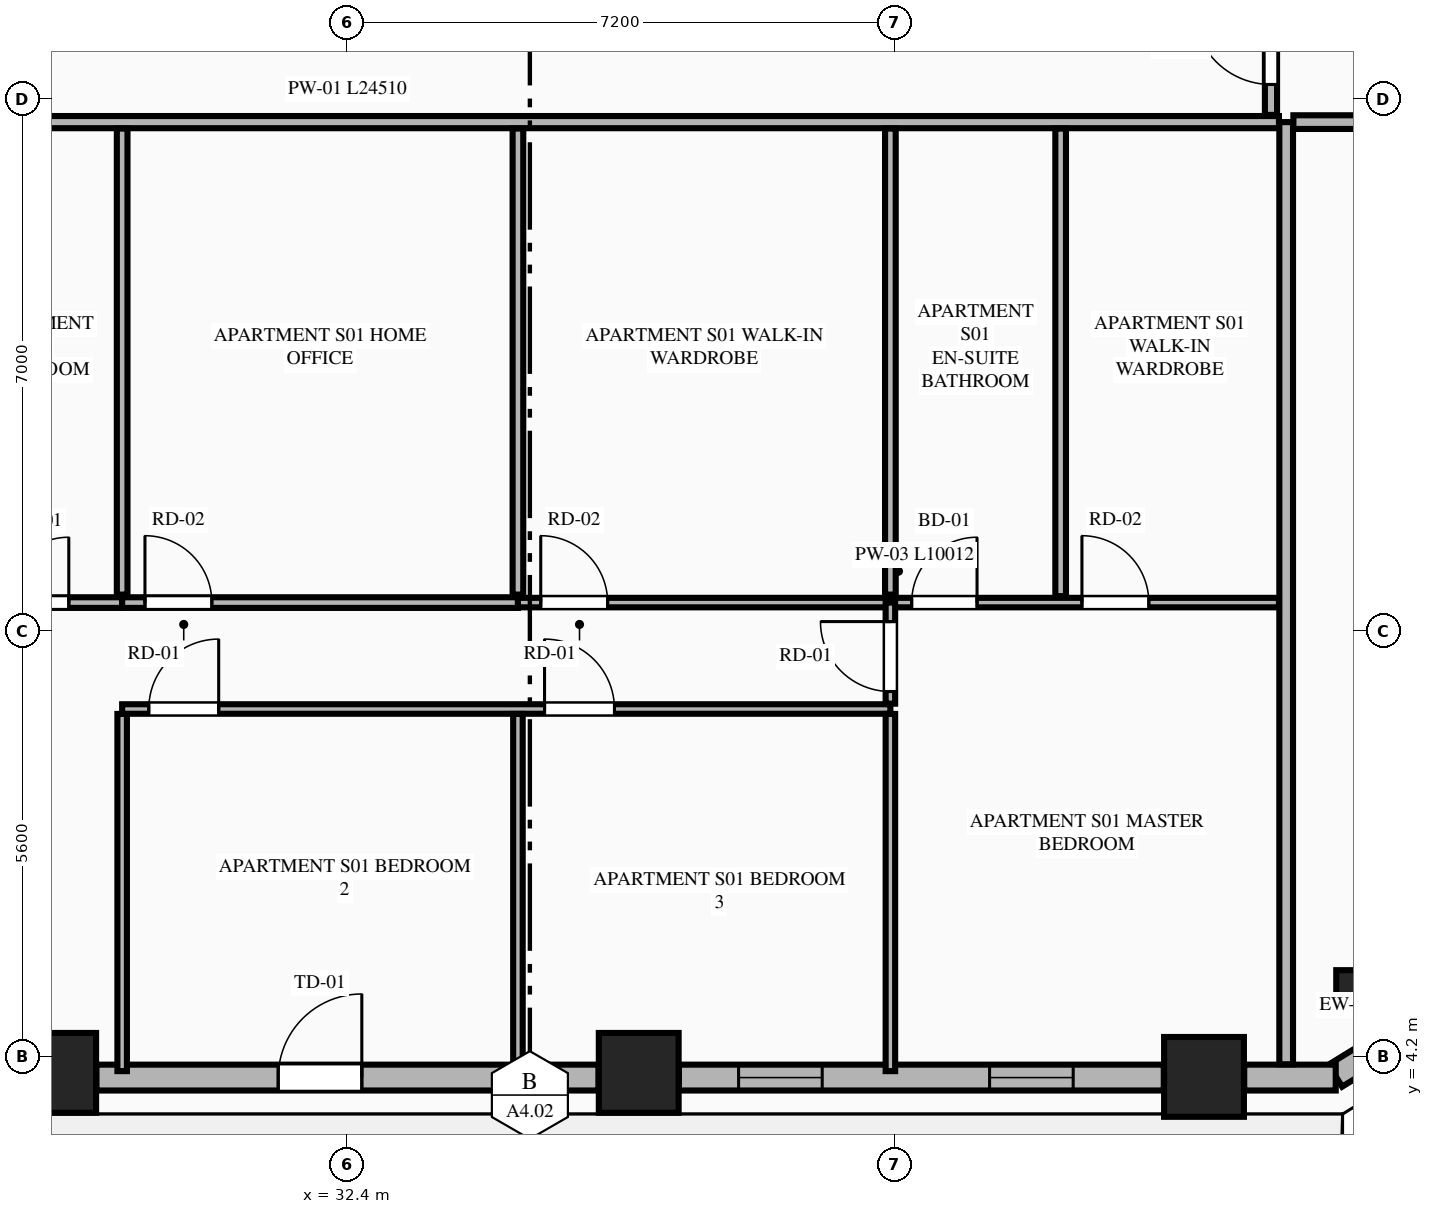
"""IFC4 building model, lengths in metres.
Left out: names, types, materials, properties, quantities, classifications, styles, units other than length and angle.
Written with IfcOpenShell. Run it as: python <this file> out.ifc"""

import sys

from ifc_helpers import new_model, si_unit, direction, frame, frame_2d, origin, origin_2d, place, context, subcontext, project, spatial, rectangle, extrude, element, fill, save


model = new_model("IFC4")
c1 = context("Model", 3, precision=1e-05, world=origin(), true_north=direction((0.0, 1.0)))
c2 = subcontext(c1, "Body", "Model", "MODEL_VIEW")
j1 = project(units=[si_unit("LENGTHUNIT", "METRE"), si_unit("PLANEANGLEUNIT", "RADIAN")], contexts=[c1])
p1 = place(None, origin())
s1 = spatial("IfcSite", under=j1, at=p1, CompositionType="ELEMENT")
p2 = place(p1, origin())
s2 = spatial("IfcBuilding", under=s1, at=p2, CompositionType="ELEMENT")
p3 = place(p2, frame((0.0, 0.0, 119.7)))
s3 = spatial("IfcBuildingStorey", under=s2, at=p3, CompositionType="ELEMENT", Elevation=119.7)
for number, where, z_axis, x_axis in (
    (1, (28.568, 3.992, 0.0), (0.0, 0.0, 1.0), (1.0, 0.0, 0.0)),
    (2, (36.232, 3.992, 0.0), (0.0, 0.0, 1.0), (1.0, 0.0, 0.0)),
    (3, (43.669, 3.939, 0.0), (0.0, 0.0, 1.0), (1.0, 0.0, 0.0)),
):
    element("IfcColumn", number, at=place(p3, frame(where, z_axis=z_axis, x_axis=x_axis)), inside=s3, PredefinedType="COLUMN", context=c2, shape_type="SweptSolid", body=[
        extrude(rectangle(XDim=1.05, YDim=1.05, at=origin_2d()), origin(), (0.0, 0.0, 1.0), 3.55),
    ])
p4 = place(p3, frame((45.659, 5.093, 0.0), z_axis=(0.0, 0.0, 1.0), x_axis=(0.865160173452, 0.501495637342, 0.0)))
e4 = element("IfcColumn", 4, at=p4, inside=s3, PredefinedType="PILASTER", context=c2, shape_type="SweptSolid", body=[
    extrude(rectangle(XDim=0.5, YDim=0.35, at=origin_2d()), origin(), (0.0, 0.0, 1.0), 3.55),
])
p5 = place(p3, frame((45.397, 3.955, 0.0), z_axis=(0.0, 0.0, 1.0), x_axis=(0.851798915137, 0.523868884523, 0.0)))
e5 = element("IfcWall", 5, at=p5, inside=s3, PredefinedType="STANDARD", context=c2, shape_type="SweptSolid", body=[
    extrude(rectangle(XDim=1.848, YDim=0.34, at=frame_2d((0.924, 0.0))), origin(), (0.0, 0.0, 1.0), 3.34),
])
p6 = place(p3, frame((29.097, 3.93, 0.0), z_axis=(0.0, 0.0, 1.0), x_axis=(1.0, 0.0, 0.0)))
e6 = element("IfcWall", 6, at=p6, inside=s3, PredefinedType="STANDARD", context=c2, shape_type="SweptSolid", body=[
    extrude(rectangle(XDim=6.606, YDim=0.34, at=frame_2d((3.303, 0.0))), origin(), (0.0, 0.0, 1.0), 2.797),
])
p7 = place(p6, frame((2.392, 0.0, 0.0)))
e7 = element("IfcOpeningElement", 7, at=p7, cuts=e6, PredefinedType="OPENING", context=c2, shape_type="SweptSolid", body=[
    extrude(rectangle(XDim=1.1, YDim=2.25, at=frame_2d((0.55, 1.125))), frame((0.0, 0.18, 0.0), z_axis=(0.0, -1.0, 0.0), x_axis=(1.0, 0.0, 0.0)), (0.0, 0.0, 1.0), 0.36),
])
p8 = place(p3, frame((36.761, 3.93, 0.0), z_axis=(0.0, 0.0, 1.0), x_axis=(1.0, 0.0, 0.0)))
e8 = element("IfcWall", 8, at=p8, inside=s3, PredefinedType="STANDARD", context=c2, shape_type="SweptSolid", body=[
    extrude(rectangle(XDim=6.379, YDim=0.34, at=frame_2d((3.189, 0.0))), origin(), (0.0, 0.0, 1.0), 2.797),
])
p9 = place(p8, frame((0.785, 0.0, 0.75)))
e9 = element("IfcOpeningElement", 9, at=p9, cuts=e8, PredefinedType="OPENING", context=c2, shape_type="SweptSolid", body=[
    extrude(rectangle(XDim=1.1, YDim=1.897, at=frame_2d((0.55, 0.948))), frame((0.0, 0.18, 0.0), z_axis=(0.0, -1.0, 0.0), x_axis=(1.0, 0.0, 0.0)), (0.0, 0.0, 1.0), 0.36),
])
p10 = place(p8, frame((4.087, 0.0, 0.75)))
e10 = element("IfcOpeningElement", 10, at=p10, cuts=e8, PredefinedType="OPENING", context=c2, shape_type="SweptSolid", body=[
    extrude(rectangle(XDim=1.1, YDim=1.897, at=frame_2d((0.55, 0.948))), frame((0.0, 0.18, 0.0), z_axis=(0.0, -1.0, 0.0), x_axis=(1.0, 0.0, 0.0)), (0.0, 0.0, 1.0), 0.36),
])
p11 = place(p3, frame((44.198, 3.93, 0.0), z_axis=(0.0, 0.0, 1.0), x_axis=(1.0, 0.0, 0.0)))
e11 = element("IfcWall", 11, at=p11, inside=s3, PredefinedType="STANDARD", context=c2, shape_type="SweptSolid", body=[
    extrude(rectangle(XDim=1.204, YDim=0.34, at=frame_2d((0.602, 0.0))), origin(), (0.0, 0.0, 1.0), 3.34),
])
p12 = place(p3, frame((44.75, 4.105, 0.0), z_axis=(0.0, 0.0, 1.0), x_axis=(0.0, 1.0, 0.0)))
e12 = element("IfcWall", 12, at=p12, inside=s3, PredefinedType="PARTITIONING", context=c2, shape_type="SweptSolid", body=[
    extrude(rectangle(XDim=12.395, YDim=0.18, at=frame_2d((6.198, 0.0))), origin(), (0.0, 0.0, 1.0), 3.34),
])
p13 = place(p3, frame((20.145, 16.5, 0.0), z_axis=(0.0, 0.0, 1.0), x_axis=(1.0, 0.0, 0.0)))
e13 = element("IfcWall", 13, at=p13, inside=s3, PredefinedType="PARTITIONING", context=c2, shape_type="SweptSolid", body=[
    extrude(rectangle(XDim=24.51, YDim=0.16, at=frame_2d((12.255, 0.0))), origin(), (0.0, 0.0, 1.0), 3.34),
])
p14 = place(p13, frame((0.405, 0.0, 0.0)))
e14 = element("IfcOpeningElement", 14, at=p14, cuts=e13, PredefinedType="OPENING", context=c2, shape_type="SweptSolid", body=[
    extrude(rectangle(XDim=1.35, YDim=2.35, at=frame_2d((0.675, 1.175))), frame((0.0, 0.09, 0.0), z_axis=(0.0, -1.0, 0.0), x_axis=(1.0, 0.0, 0.0)), (0.0, 0.0, 1.0), 0.18),
])
p15 = place(p3, frame((22.1, 10.179, 0.0), z_axis=(0.0, 0.0, 1.0), x_axis=(1.0, 0.0, 0.0)))
e15 = element("IfcWall", 15, at=p15, inside=s3, PredefinedType="PLUMBINGWALL", context=c2, shape_type="SweptSolid", body=[
    extrude(rectangle(XDim=7.336, YDim=0.14, at=frame_2d((3.668, 0.0))), origin(), (0.0, 0.0, 1.0), 3.34),
])
p16 = place(p15, frame((5.774, 0.0, 0.0)))
e16 = element("IfcOpeningElement", 16, at=p16, cuts=e15, PredefinedType="OPENING", context=c2, shape_type="SweptSolid", body=[
    extrude(rectangle(XDim=0.86, YDim=2.1, at=frame_2d((0.43, 1.05))), frame((0.0, 0.08, 0.0), z_axis=(0.0, -1.0, 0.0), x_axis=(1.0, 0.0, 0.0)), (0.0, 0.0, 1.0), 0.16),
])
p17 = place(p15, frame((0.26, 0.0, 0.0)))
e17 = element("IfcOpeningElement", 17, at=p17, cuts=e15, PredefinedType="OPENING", context=c2, shape_type="SweptSolid", body=[
    extrude(rectangle(XDim=0.88, YDim=2.15, at=frame_2d((0.44, 1.075))), frame((0.0, 0.08, 0.0), z_axis=(0.0, -1.0, 0.0), x_axis=(1.0, 0.0, 0.0)), (0.0, 0.0, 1.0), 0.16),
])
p18 = place(p15, frame((3.485, 0.0, 0.0)))
e18 = element("IfcOpeningElement", 18, at=p18, cuts=e15, PredefinedType="OPENING", context=c2, shape_type="SweptSolid", body=[
    extrude(rectangle(XDim=0.88, YDim=2.15, at=frame_2d((0.44, 1.075))), frame((0.0, 0.08, 0.0), z_axis=(0.0, -1.0, 0.0), x_axis=(1.0, 0.0, 0.0)), (0.0, 0.0, 1.0), 0.16),
])
p19 = place(p3, frame((29.436, 10.179, 0.0), z_axis=(0.0, 0.0, 1.0), x_axis=(1.0, 0.0, 0.0)))
e19 = element("IfcWall", 19, at=p19, inside=s3, PredefinedType="PLUMBINGWALL", context=c2, shape_type="SweptSolid", body=[
    extrude(rectangle(XDim=5.207, YDim=0.14, at=frame_2d((2.604, 0.0))), origin(), (0.0, 0.0, 1.0), 3.34),
])
p20 = place(p19, frame((0.3, 0.0, 0.0)))
e20 = element("IfcOpeningElement", 20, at=p20, cuts=e19, PredefinedType="OPENING", context=c2, shape_type="SweptSolid", body=[
    extrude(rectangle(XDim=0.88, YDim=2.15, at=frame_2d((0.44, 1.075))), frame((0.0, 0.08, 0.0), z_axis=(0.0, -1.0, 0.0), x_axis=(1.0, 0.0, 0.0)), (0.0, 0.0, 1.0), 0.16),
])
p21 = place(p3, frame((34.643, 10.179, 0.0), z_axis=(0.0, 0.0, 1.0), x_axis=(1.0, 0.0, 0.0)))
e21 = element("IfcWall", 21, at=p21, inside=s3, PredefinedType="PARTITIONING", context=c2, shape_type="SweptSolid", body=[
    extrude(rectangle(XDim=10.012, YDim=0.125, at=frame_2d((5.006, 0.0))), origin(), (0.0, 0.0, 1.0), 3.34),
])
p22 = place(p21, frame((5.18, 0.0, 0.0)))
e22 = element("IfcOpeningElement", 22, at=p22, cuts=e21, PredefinedType="OPENING", context=c2, shape_type="SweptSolid", body=[
    extrude(rectangle(XDim=0.86, YDim=2.1, at=frame_2d((0.43, 1.05))), frame((0.0, 0.073, 0.0), z_axis=(0.0, -1.0, 0.0), x_axis=(1.0, 0.0, 0.0)), (0.0, 0.0, 1.0), 0.145),
])
p23 = place(p21, frame((7.42, 0.0, 0.0)))
e23 = element("IfcOpeningElement", 23, at=p23, cuts=e21, PredefinedType="OPENING", context=c2, shape_type="SweptSolid", body=[
    extrude(rectangle(XDim=0.88, YDim=2.15, at=frame_2d((0.44, 1.075))), frame((0.0, 0.073, 0.0), z_axis=(0.0, -1.0, 0.0), x_axis=(1.0, 0.0, 0.0)), (0.0, 0.0, 1.0), 0.145),
])
p24 = place(p21, frame((0.3, 0.0, 0.0)))
e24 = element("IfcOpeningElement", 24, at=p24, cuts=e21, PredefinedType="OPENING", context=c2, shape_type="SweptSolid", body=[
    extrude(rectangle(XDim=0.88, YDim=2.15, at=frame_2d((0.44, 1.075))), frame((0.0, 0.073, 0.0), z_axis=(0.0, -1.0, 0.0), x_axis=(1.0, 0.0, 0.0)), (0.0, 0.0, 1.0), 0.145),
])
p25 = place(p3, frame((29.436, 4.015, 0.0), z_axis=(0.0, 0.0, 1.0), x_axis=(0.0, 1.0, 0.0)))
e25 = element("IfcWall", 25, at=p25, inside=s3, PredefinedType="PARTITIONING", context=c2, shape_type="SweptSolid", body=[
    extrude(rectangle(XDim=4.699, YDim=0.125, at=frame_2d((2.35, 0.0))), origin(), (0.0, 0.0, 1.0), 3.34),
])
p26 = place(p3, frame((29.436, 8.779, 0.0), z_axis=(0.0, 0.0, 1.0), x_axis=(1.0, 0.0, 0.0)))
e26 = element("IfcWall", 26, at=p26, inside=s3, PredefinedType="PARTITIONING", context=c2, shape_type="SweptSolid", body=[
    extrude(rectangle(XDim=10.107, YDim=0.125, at=frame_2d((5.053, 0.0))), origin(), (0.0, 0.0, 1.0), 3.34),
])
p27 = place(p26, frame((0.35, 0.0, 0.0)))
e27 = element("IfcOpeningElement", 27, at=p27, cuts=e26, PredefinedType="OPENING", context=c2, shape_type="SweptSolid", body=[
    extrude(rectangle(XDim=0.92, YDim=2.15, at=frame_2d((0.46, 1.075))), frame((0.0, 0.073, 0.0), z_axis=(0.0, -1.0, 0.0), x_axis=(1.0, 0.0, 0.0)), (0.0, 0.0, 1.0), 0.145),
])
p28 = place(p26, frame((5.557, 0.0, 0.0)))
e28 = element("IfcOpeningElement", 28, at=p28, cuts=e26, PredefinedType="OPENING", context=c2, shape_type="SweptSolid", body=[
    extrude(rectangle(XDim=0.92, YDim=2.15, at=frame_2d((0.46, 1.075))), frame((0.0, 0.073, 0.0), z_axis=(0.0, -1.0, 0.0), x_axis=(1.0, 0.0, 0.0)), (0.0, 0.0, 1.0), 0.145),
])
p29 = place(p3, frame((39.543, 8.849, 0.0), z_axis=(0.0, 0.0, 1.0), x_axis=(0.0, 1.0, 0.0)))
e29 = element("IfcWall", 29, at=p29, inside=s3, PredefinedType="PARTITIONING", context=c2, shape_type="SweptSolid", body=[
    extrude(rectangle(XDim=1.33, YDim=0.125, at=frame_2d((0.665, 0.0))), origin(), (0.0, 0.0, 1.0), 3.34),
])
p30 = place(p29, frame((0.16, 0.0, 0.0)))
e30 = element("IfcOpeningElement", 30, at=p30, cuts=e29, PredefinedType="OPENING", context=c2, shape_type="SweptSolid", body=[
    extrude(rectangle(XDim=0.92, YDim=2.15, at=frame_2d((0.46, 1.075))), frame((0.0, 0.073, 0.0), z_axis=(0.0, -1.0, 0.0), x_axis=(1.0, 0.0, 0.0)), (0.0, 0.0, 1.0), 0.145),
])
for number, where, z_axis, x_axis in (
    (31, (29.436, 10.284, 0.0), (0.0, 0.0, 1.0), (0.0, 1.0, 0.0)),
    (32, (34.643, 10.284, 0.0), (0.0, 0.0, 1.0), (0.0, 1.0, 0.0)),
):
    element("IfcWall", number, at=place(p3, frame(where, z_axis=z_axis, x_axis=x_axis)), inside=s3, PredefinedType="PLUMBINGWALL", context=c2, shape_type="SweptSolid", body=[
        extrude(rectangle(XDim=6.131, YDim=0.14, at=frame_2d((3.065, 0.0))), origin(), (0.0, 0.0, 1.0), 3.34),
    ])
for number, where, z_axis, x_axis in (
    (33, (34.643, 4.015, 0.0), (0.0, 0.0, 1.0), (0.0, 1.0, 0.0)),
    (34, (39.543, 4.015, 0.0), (0.0, 0.0, 1.0), (0.0, 1.0, 0.0)),
):
    element("IfcWall", number, at=place(p3, frame(where, z_axis=z_axis, x_axis=x_axis)), inside=s3, PredefinedType="PARTITIONING", context=c2, shape_type="SweptSolid", body=[
        extrude(rectangle(XDim=4.699, YDim=0.125, at=frame_2d((2.35, 0.0))), origin(), (0.0, 0.0, 1.0), 3.34),
    ])
p31 = place(p3, frame((39.543, 10.284, 0.0), z_axis=(0.0, 0.0, 1.0), x_axis=(0.0, 1.0, 0.0)))
e35 = element("IfcWall", 35, at=p31, inside=s3, PredefinedType="PLUMBINGWALL", context=c2, shape_type="SweptSolid", body=[
    extrude(rectangle(XDim=6.131, YDim=0.14, at=frame_2d((3.065, 0.0))), origin(), (0.0, 0.0, 1.0), 3.34),
])
p32 = place(p3, frame((41.783, 10.264, 0.0), z_axis=(0.0, 0.0, 1.0), x_axis=(0.0, 1.0, 0.0)))
e36 = element("IfcWall", 36, at=p32, inside=s3, PredefinedType="PLUMBINGWALL", context=c2, shape_type="SweptSolid", body=[
    extrude(rectangle(XDim=6.151, YDim=0.14, at=frame_2d((3.076, 0.0))), origin(), (0.0, 0.0, 1.0), 2.722),
])
p33 = place(p3, frame((44.845, 16.5, 0.0), z_axis=(0.0, 0.0, 1.0), x_axis=(1.0, 0.0, 0.0)))
e37 = element("IfcWall", 37, at=p33, inside=s3, PredefinedType="PARTITIONING", context=c2, shape_type="SweptSolid", body=[
    extrude(rectangle(XDim=7.77, YDim=0.18, at=frame_2d((3.885, 0.0))), origin(), (0.0, 0.0, 1.0), 3.34),
])
p34 = place(p3, frame((44.55, 16.595, 0.0), z_axis=(0.0, 0.0, 1.0), x_axis=(0.0, 1.0, 0.0)))
e38 = element("IfcWall", 38, at=p34, inside=s3, PredefinedType="PARTITIONING", context=c2, shape_type="SweptSolid", body=[
    extrude(rectangle(XDim=9.586, YDim=0.16, at=frame_2d((4.793, 0.0))), origin(), (0.0, 0.0, 1.0), 3.34),
])
p35 = place(p34, frame((0.4, 0.0, 0.0)))
e39 = element("IfcOpeningElement", 39, at=p35, cuts=e38, PredefinedType="OPENING", context=c2, shape_type="SweptSolid", body=[
    extrude(rectangle(XDim=1.02, YDim=2.25, at=frame_2d((0.51, 1.125))), frame((0.0, 0.09, 0.0), z_axis=(0.0, -1.0, 0.0), x_axis=(1.0, 0.0, 0.0)), (0.0, 0.0, 1.0), 0.18),
])
p36 = place(p7, origin())
e40 = element("IfcDoor", 40, at=p36, inside=s3, OperationType="SINGLE_SWING_RIGHT", PredefinedType="DOOR", context=c2, shape_type="SweptSolid", body=[
    extrude(rectangle(XDim=1.1, YDim=2.25, at=frame_2d((0.55, 1.125))), frame((0.0, 0.025, 0.0), z_axis=(0.0, -1.0, 0.0), x_axis=(1.0, 0.0, 0.0)), (0.0, 0.0, 1.0), 0.05),
])
fill(e7, e40)
p37 = place(p9, origin())
e41 = element("IfcWindow", 41, at=p37, inside=s3, PartitioningType="SINGLE_PANEL", PredefinedType="WINDOW", context=c2, shape_type="SweptSolid", body=[
    extrude(rectangle(XDim=1.1, YDim=1.897, at=frame_2d((0.55, 0.948))), frame((0.0, 0.03, 0.0), z_axis=(0.0, -1.0, 0.0), x_axis=(1.0, 0.0, 0.0)), (0.0, 0.0, 1.0), 0.06),
])
fill(e9, e41)
p38 = place(p16, origin())
e42 = element("IfcDoor", 42, at=p38, inside=s3, OperationType="SINGLE_SWING_RIGHT", PredefinedType="DOOR", context=c2, shape_type="SweptSolid", body=[
    extrude(rectangle(XDim=0.86, YDim=2.1, at=frame_2d((0.43, 1.05))), frame((0.0, 0.025, 0.0), z_axis=(0.0, -1.0, 0.0), x_axis=(1.0, 0.0, 0.0)), (0.0, 0.0, 1.0), 0.05),
])
fill(e16, e42)
p39 = place(p22, origin())
e43 = element("IfcDoor", 43, at=p39, inside=s3, OperationType="SINGLE_SWING_RIGHT", PredefinedType="DOOR", context=c2, shape_type="SweptSolid", body=[
    extrude(rectangle(XDim=0.86, YDim=2.1, at=frame_2d((0.43, 1.05))), frame((0.0, 0.025, 0.0), z_axis=(0.0, -1.0, 0.0), x_axis=(1.0, 0.0, 0.0)), (0.0, 0.0, 1.0), 0.05),
])
fill(e22, e43)
p40 = place(p23, origin())
e44 = element("IfcDoor", 44, at=p40, inside=s3, OperationType="SINGLE_SWING_LEFT", PredefinedType="DOOR", context=c2, shape_type="SweptSolid", body=[
    extrude(rectangle(XDim=0.88, YDim=2.15, at=frame_2d((0.44, 1.075))), frame((0.0, 0.025, 0.0), z_axis=(0.0, -1.0, 0.0), x_axis=(1.0, 0.0, 0.0)), (0.0, 0.0, 1.0), 0.05),
])
fill(e23, e44)
p41 = place(p20, origin())
e45 = element("IfcDoor", 45, at=p41, inside=s3, OperationType="SINGLE_SWING_LEFT", PredefinedType="DOOR", context=c2, shape_type="SweptSolid", body=[
    extrude(rectangle(XDim=0.88, YDim=2.15, at=frame_2d((0.44, 1.075))), frame((0.0, 0.025, 0.0), z_axis=(0.0, -1.0, 0.0), x_axis=(1.0, 0.0, 0.0)), (0.0, 0.0, 1.0), 0.05),
])
fill(e20, e45)
p42 = place(p27, origin())
e46 = element("IfcDoor", 46, at=p42, inside=s3, OperationType="SINGLE_SWING_RIGHT", PredefinedType="DOOR", context=c2, shape_type="SweptSolid", body=[
    extrude(rectangle(XDim=0.92, YDim=2.15, at=frame_2d((0.46, 1.075))), frame((0.0, 0.025, 0.0), z_axis=(0.0, -1.0, 0.0), x_axis=(1.0, 0.0, 0.0)), (0.0, 0.0, 1.0), 0.05),
])
fill(e27, e46)
p43 = place(p28, origin())
e47 = element("IfcDoor", 47, at=p43, inside=s3, OperationType="SINGLE_SWING_LEFT", PredefinedType="DOOR", context=c2, shape_type="SweptSolid", body=[
    extrude(rectangle(XDim=0.92, YDim=2.15, at=frame_2d((0.46, 1.075))), frame((0.0, 0.025, 0.0), z_axis=(0.0, -1.0, 0.0), x_axis=(1.0, 0.0, 0.0)), (0.0, 0.0, 1.0), 0.05),
])
fill(e28, e47)
p44 = place(p30, origin())
e48 = element("IfcDoor", 48, at=p44, inside=s3, OperationType="SINGLE_SWING_RIGHT", PredefinedType="DOOR", context=c2, shape_type="SweptSolid", body=[
    extrude(rectangle(XDim=0.92, YDim=2.15, at=frame_2d((0.46, 1.075))), frame((0.0, 0.025, 0.0), z_axis=(0.0, -1.0, 0.0), x_axis=(1.0, 0.0, 0.0)), (0.0, 0.0, 1.0), 0.05),
])
fill(e30, e48)
p45 = place(p24, origin())
e49 = element("IfcDoor", 49, at=p45, inside=s3, OperationType="SINGLE_SWING_LEFT", PredefinedType="DOOR", context=c2, shape_type="SweptSolid", body=[
    extrude(rectangle(XDim=0.88, YDim=2.15, at=frame_2d((0.44, 1.075))), frame((0.0, 0.025, 0.0), z_axis=(0.0, -1.0, 0.0), x_axis=(1.0, 0.0, 0.0)), (0.0, 0.0, 1.0), 0.05),
])
fill(e24, e49)
p46 = place(p35, origin())
e50 = element("IfcDoor", 50, at=p46, inside=s3, OperationType="SINGLE_SWING_RIGHT", PredefinedType="DOOR", context=c2, shape_type="SweptSolid", body=[
    extrude(rectangle(XDim=1.02, YDim=2.25, at=frame_2d((0.51, 1.125))), frame((0.0, 0.025, 0.0), z_axis=(0.0, -1.0, 0.0), x_axis=(1.0, 0.0, 0.0)), (0.0, 0.0, 1.0), 0.05),
])
fill(e39, e50)
p47 = place(p10, origin())
e51 = element("IfcWindow", 51, at=p47, inside=s3, PartitioningType="SINGLE_PANEL", PredefinedType="WINDOW", context=c2, shape_type="SweptSolid", body=[
    extrude(rectangle(XDim=1.1, YDim=1.897, at=frame_2d((0.55, 0.948))), frame((0.0, 0.03, 0.0), z_axis=(0.0, -1.0, 0.0), x_axis=(1.0, 0.0, 0.0)), (0.0, 0.0, 1.0), 0.06),
])
fill(e10, e51)
save(model, sys.argv[1])
